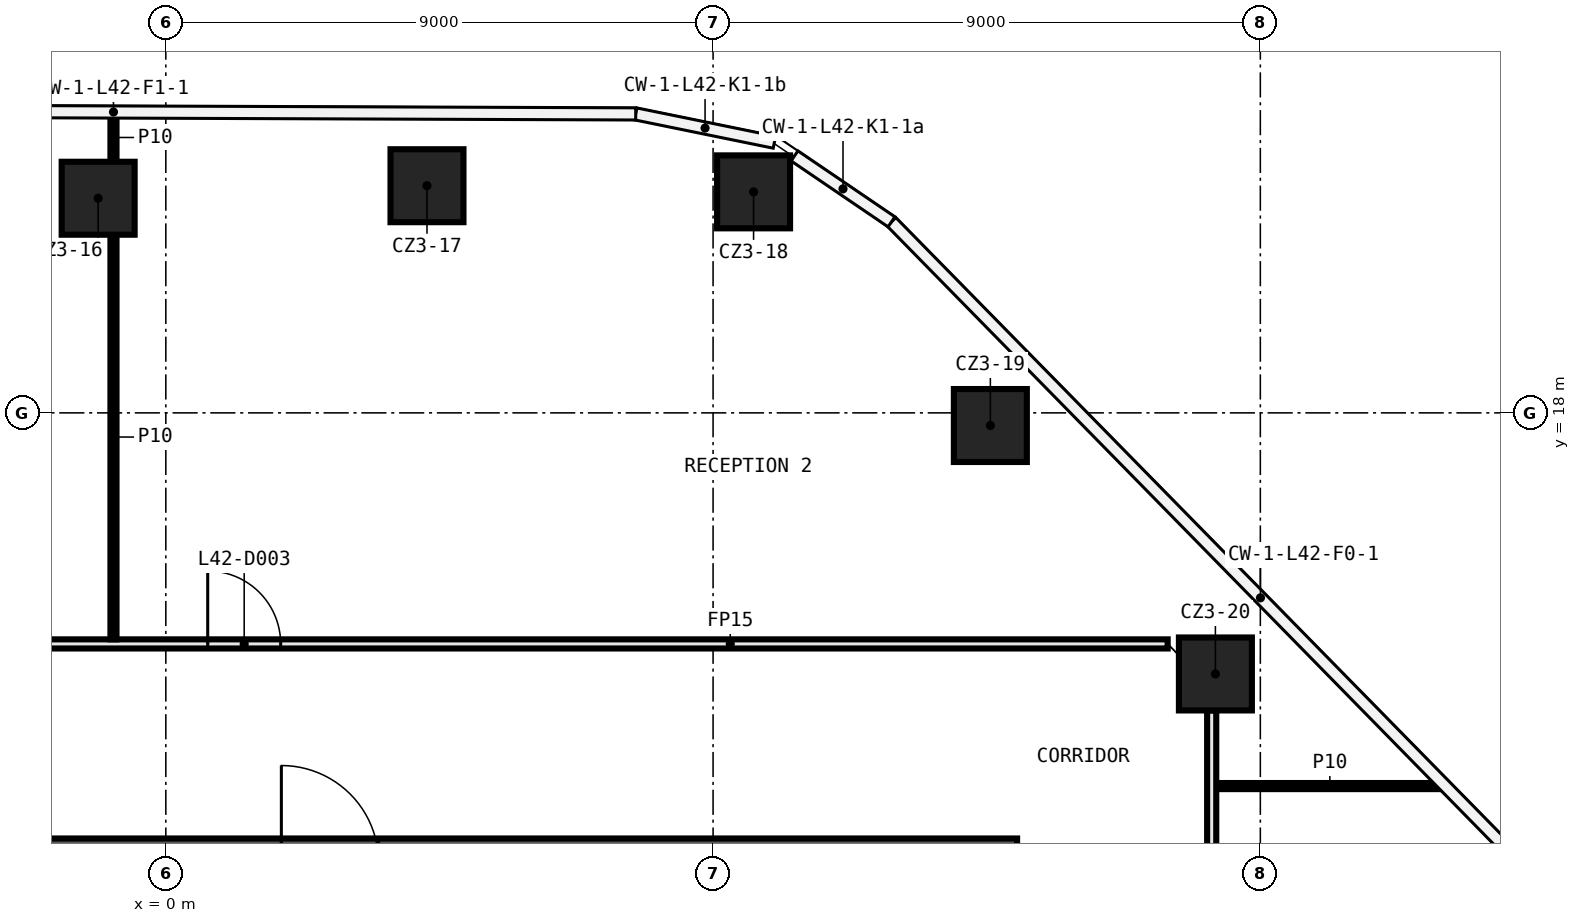
"""IFC4 building model, lengths in metres.
Left out: names, types, materials, properties, quantities, classifications, styles, units other than length and angle.
Written with IfcOpenShell. Run it as: python <this file> out.ifc"""

import sys

from ifc_helpers import new_model, si_unit, direction, frame, frame_2d, origin, origin_2d, place, context, subcontext, project, spatial, rectangle, extrude, element, fill, save


model = new_model("IFC4")
c1 = context("Model", 3, precision=1e-05, world=origin(), true_north=direction((0.0, 1.0)))
c2 = subcontext(c1, "Body", "Model", "MODEL_VIEW")
j1 = project(units=[si_unit("LENGTHUNIT", "METRE"), si_unit("PLANEANGLEUNIT", "RADIAN")], contexts=[c1])
p1 = place(None, origin())
s1 = spatial("IfcSite", under=j1, at=p1, CompositionType="ELEMENT")
p2 = place(p1, origin())
s2 = spatial("IfcBuilding", under=s1, at=p2, CompositionType="ELEMENT")
p3 = place(p2, frame((0.0, 0.0, 203.0)))
s3 = spatial("IfcBuildingStorey", under=s2, at=p3, CompositionType="ELEMENT", Elevation=203.0)
for number, where, z_axis, x_axis in (
    (1, (-1.113, 21.53, 0.0), (0.0, 0.0, 1.0), (1.0, 0.0, 0.0)),
    (2, (4.295, 21.736, 0.0), (0.0, 0.0, 1.0), (1.0, 0.0, 0.0)),
    (3, (9.666, 21.635, 0.0), (0.0, 0.0, 1.0), (1.0, 0.0, 0.0)),
    (4, (13.56, 17.792, 0.0), (0.0, 0.0, 1.0), (1.0, 0.0, 0.0)),
    (5, (17.261, 13.706, 0.0), (0.0, 0.0, 1.0), (1.0, 0.0, 0.0)),
):
    element("IfcColumn", number, at=place(p3, frame(where, z_axis=z_axis, x_axis=x_axis)), inside=s3, PredefinedType="COLUMN", context=c2, shape_type="SweptSolid", body=[
        extrude(rectangle(XDim=1.2, YDim=1.2, at=origin_2d()), origin(), (0.0, 0.0, 1.0), 3.82),
    ])
p4 = place(p3, frame((17.275, 11.862, 0.0), z_axis=(0.0, 0.0, 1.0), x_axis=(1.0, 0.0, 0.0)))
e6 = element("IfcWall", 6, at=p4, inside=s3, PredefinedType="PARTITIONING", context=c2, shape_type="SweptSolid", body=[
    extrude(rectangle(XDim=3.737, YDim=0.1, at=frame_2d((1.868, 0.0))), origin(), (0.0, 0.0, 1.0), 3.82),
])
p5 = place(p3, frame((-5.075, 14.2, 0.0), z_axis=(0.0, 0.0, 1.0), x_axis=(1.0, 0.0, 0.0)))
e7 = element("IfcWall", 7, at=p5, inside=s3, PredefinedType="PARTITIONING", context=c2, shape_type="SweptSolid", body=[
    extrude(rectangle(XDim=21.551, YDim=0.15, at=frame_2d((10.775, 0.0))), origin(), (0.0, 0.0, 1.0), 3.82),
])
p6 = place(p5, frame((5.764, 0.0, 0.0)))
e8 = element("IfcOpeningElement", 8, at=p6, cuts=e7, PredefinedType="OPENING", context=c2, shape_type="SweptSolid", body=[
    extrude(rectangle(XDim=1.2, YDim=2.1, at=frame_2d((0.6, 1.05))), frame((0.0, 0.085, 0.0), z_axis=(0.0, -1.0, 0.0), x_axis=(1.0, 0.0, 0.0)), (0.0, 0.0, 1.0), 0.17),
])
p7 = place(p5, frame((1.545, 0.0, 0.0)))
e9 = element("IfcOpeningElement", 9, at=p7, cuts=e7, PredefinedType="OPENING", context=c2, shape_type="SweptSolid", body=[
    extrude(rectangle(XDim=1.2, YDim=2.1, at=frame_2d((0.6, 1.05))), frame((0.0, 0.085, 0.0), z_axis=(0.0, -1.0, 0.0), x_axis=(1.0, 0.0, 0.0)), (0.0, 0.0, 1.0), 0.17),
])
p8 = place(p3, frame((17.2, 13.106, 0.0), z_axis=(0.0, 0.0, 1.0), x_axis=(0.0, -1.0, 0.0)))
e10 = element("IfcWall", 10, at=p8, inside=s3, PredefinedType="PARTITIONING", context=c2, shape_type="SweptSolid", body=[
    extrude(rectangle(XDim=23.172, YDim=0.15, at=frame_2d((11.586, 0.0))), origin(), (0.0, 0.0, 1.0), 3.82),
])
p9 = place(p8, frame((4.412, 0.0, 0.0)))
e11 = element("IfcOpeningElement", 11, at=p9, cuts=e10, PredefinedType="OPENING", context=c2, shape_type="SweptSolid", body=[
    extrude(rectangle(XDim=1.2, YDim=2.1, at=frame_2d((0.6, 1.05))), frame((0.0, 0.085, 0.0), z_axis=(0.0, -1.0, 0.0), x_axis=(1.0, 0.0, 0.0)), (0.0, 0.0, 1.0), 0.17),
])
p10 = place(p3, frame((-0.861, 14.275, 0.0), z_axis=(0.0, 0.0, 1.0), x_axis=(0.0, 1.0, 0.0)))
e12 = element("IfcWall", 12, at=p10, inside=s3, PredefinedType="PARTITIONING", context=c2, shape_type="SweptSolid", body=[
    extrude(rectangle(XDim=6.655, YDim=0.1, at=frame_2d((3.328, 0.0))), origin(), (0.0, 0.0, 1.0), 3.82),
])
p11 = place(p3, frame((-0.861, 22.13, 0.0), z_axis=(0.0, 0.0, 1.0), x_axis=(0.0, 1.0, 0.0)))
e13 = element("IfcWall", 13, at=p11, inside=s3, PredefinedType="PARTITIONING", context=c2, shape_type="SweptSolid", body=[
    extrude(rectangle(XDim=0.799, YDim=0.1, at=frame_2d((0.399, 0.0))), origin(), (0.0, 0.0, 1.0), 3.82),
])
p12 = place(p3, frame((-14.0, 10.6, 0.0), z_axis=(0.0, 0.0, 1.0), x_axis=(1.0, 0.0, 0.0)))
e14 = element("IfcWall", 14, at=p12, inside=s3, PredefinedType="SHEAR", context=c2, shape_type="SweptSolid", body=[
    extrude(rectangle(XDim=28.0, YDim=0.8, at=frame_2d((14.0, 0.0))), origin(), (0.0, 0.0, 1.0), 3.82),
])
p13 = place(p12, frame((15.9, 0.0, 0.0)))
e15 = element("IfcOpeningElement", 15, at=p13, cuts=e14, PredefinedType="OPENING", context=c2, shape_type="SweptSolid", body=[
    extrude(rectangle(XDim=1.6, YDim=2.1, at=frame_2d((0.8, 1.05))), frame((0.0, 0.41, 0.0), z_axis=(0.0, -1.0, 0.0), x_axis=(1.0, 0.0, 0.0)), (0.0, 0.0, 1.0), 0.82),
])
p14 = place(p6, origin())
e16 = element("IfcDoor", 16, at=p14, inside=s3, OperationType="SINGLE_SWING_RIGHT", PredefinedType="DOOR", context=c2, shape_type="SweptSolid", body=[
    extrude(rectangle(XDim=1.2, YDim=2.1, at=frame_2d((0.6, 1.05))), frame((0.0, 0.025, 0.0), z_axis=(0.0, -1.0, 0.0), x_axis=(1.0, 0.0, 0.0)), (0.0, 0.0, 1.0), 0.05),
])
fill(e8, e16)
save(model, sys.argv[1])
